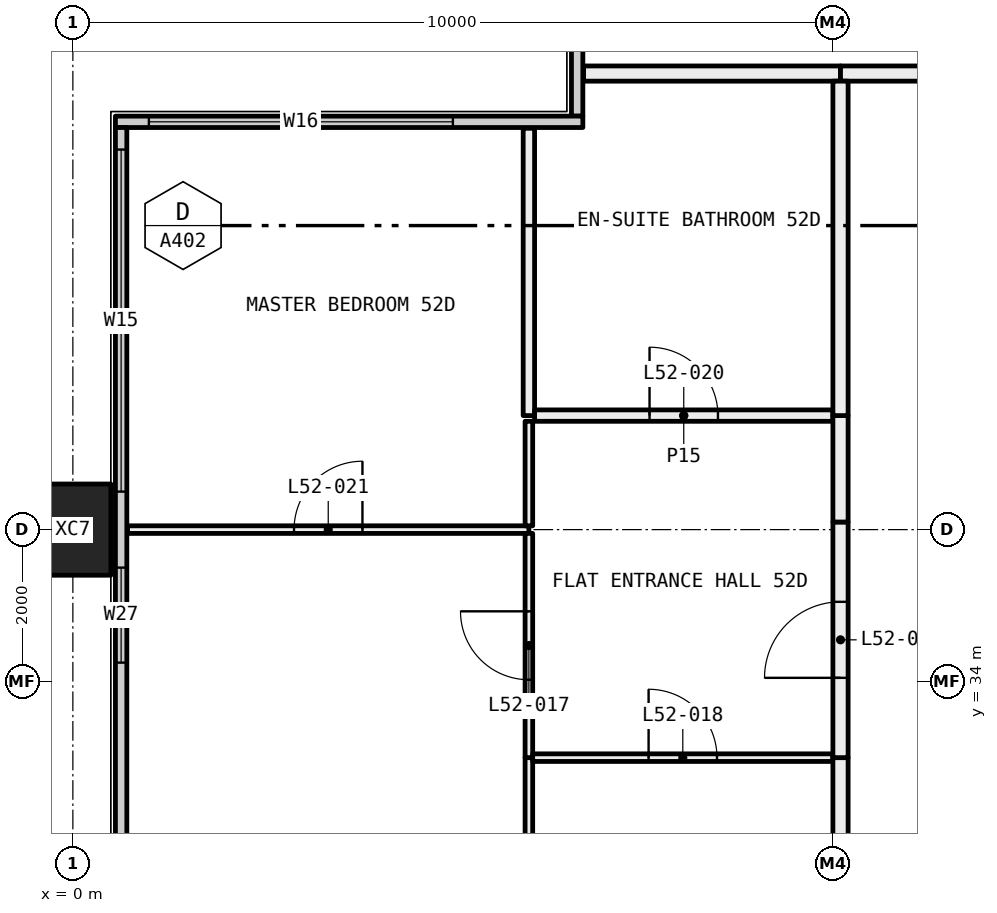
"""IFC4 building model, lengths in metres.
Left out: names, types, materials, properties, quantities, classifications, styles, units other than length and angle.
Written with IfcOpenShell. Run it as: python <this file> out.ifc"""

import sys

from ifc_helpers import new_model, si_unit, direction, frame, frame_2d, origin, origin_2d, place, context, subcontext, project, spatial, rectangle, hollow_rectangle, extrude, element, fill, save


model = new_model("IFC4")
c1 = context("Model", 3, precision=1e-05, world=origin(), true_north=direction((0.0, 1.0)))
c2 = subcontext(c1, "Body", "Model", "MODEL_VIEW")
j1 = project(units=[si_unit("LENGTHUNIT", "METRE"), si_unit("PLANEANGLEUNIT", "RADIAN")], contexts=[c1])
p1 = place(None, origin())
s1 = spatial("IfcSite", under=j1, at=p1, CompositionType="ELEMENT")
p2 = place(p1, origin())
s2 = spatial("IfcBuilding", under=s1, at=p2, CompositionType="ELEMENT")
p3 = place(p2, frame((0.0, 0.0, 196.2)))
s3 = spatial("IfcBuildingStorey", under=s2, at=p3, CompositionType="ELEMENT", Elevation=196.2)
p4 = place(p3, frame((0.0, 36.0, -0.4), z_axis=(0.0, 0.0, 1.0), x_axis=(0.0, 1.0, 0.0)))
e1 = element("IfcColumn", 1, at=p4, inside=s3, PredefinedType="COLUMN", context=c2, shape_type="SweptSolid", body=[
    extrude(hollow_rectangle(XDim=1.2, YDim=1.0, WallThickness=0.045, at=origin_2d()), origin(), (0.0, 0.0, 1.0), 3.45),
])
p5 = place(p3, frame((6.635, 41.44, 0.0), z_axis=(0.0, 0.0, 1.0), x_axis=(0.0, 1.0, 0.0)))
e2 = element("IfcWall", 2, at=p5, inside=s3, PredefinedType="ELEMENTEDWALL", context=c2, shape_type="SweptSolid", body=[
    extrude(rectangle(XDim=5.85, YDim=0.15, at=frame_2d((2.925, 0.0))), origin(), (0.0, 0.0, 1.0), 3.05),
])
p6 = place(p5, frame((1.56, 0.0, 0.45)))
e3 = element("IfcOpeningElement", 3, at=p6, cuts=e2, PredefinedType="OPENING", context=c2, shape_type="SweptSolid", body=[
    extrude(rectangle(XDim=4.0, YDim=2.55, at=frame_2d((2.0, 1.275))), frame((0.0, 0.085, 0.0), z_axis=(0.0, -1.0, 0.0), x_axis=(1.0, 0.0, 0.0)), (0.0, 0.0, 1.0), 0.17),
])
p7 = place(p3, frame((0.56, 41.365, 0.0), z_axis=(0.0, 0.0, 1.0), x_axis=(1.0, 0.0, 0.0)))
e4 = element("IfcWall", 4, at=p7, inside=s3, PredefinedType="ELEMENTEDWALL", context=c2, shape_type="SweptSolid", body=[
    extrude(rectangle(XDim=6.15, YDim=0.15, at=frame_2d((3.075, 0.0))), origin(), (0.0, 0.0, 1.0), 3.05),
])
p8 = place(p7, frame((0.44, 0.0, 0.45)))
e5 = element("IfcOpeningElement", 5, at=p8, cuts=e4, PredefinedType="OPENING", context=c2, shape_type="SweptSolid", body=[
    extrude(rectangle(XDim=4.0, YDim=2.55, at=frame_2d((2.0, 1.275))), frame((0.0, 0.085, 0.0), z_axis=(0.0, -1.0, 0.0), x_axis=(1.0, 0.0, 0.0)), (0.0, 0.0, 1.0), 0.17),
])
p9 = place(p3, frame((0.635, 18.71, 0.0), z_axis=(0.0, 0.0, 1.0), x_axis=(0.0, 1.0, 0.0)))
e6 = element("IfcWall", 6, at=p9, inside=s3, PredefinedType="ELEMENTEDWALL", context=c2, shape_type="SweptSolid", body=[
    extrude(rectangle(XDim=22.58, YDim=0.15, at=frame_2d((11.29, 0.0))), origin(), (0.0, 0.0, 1.0), 3.05),
])
p10 = place(p9, frame((0.29, 0.0, 0.45)))
e7 = element("IfcOpeningElement", 7, at=p10, cuts=e6, PredefinedType="OPENING", context=c2, shape_type="SweptSolid", body=[
    extrude(rectangle(XDim=4.5, YDim=2.55, at=frame_2d((2.25, 1.275))), frame((0.0, 0.085, 0.0), z_axis=(0.0, -1.0, 0.0), x_axis=(1.0, 0.0, 0.0)), (0.0, 0.0, 1.0), 0.17),
])
p11 = place(p9, frame((5.79, 0.0, 0.45)))
e8 = element("IfcOpeningElement", 8, at=p11, cuts=e6, PredefinedType="OPENING", context=c2, shape_type="SweptSolid", body=[
    extrude(rectangle(XDim=1.25, YDim=2.55, at=frame_2d((0.625, 1.275))), frame((0.0, 0.085, 0.0), z_axis=(0.0, -1.0, 0.0), x_axis=(1.0, 0.0, 0.0)), (0.0, 0.0, 1.0), 0.17),
])
p12 = place(p9, frame((9.54, 0.0, 0.45)))
e9 = element("IfcOpeningElement", 9, at=p12, cuts=e6, PredefinedType="OPENING", context=c2, shape_type="SweptSolid", body=[
    extrude(rectangle(XDim=1.25, YDim=2.55, at=frame_2d((0.625, 1.275))), frame((0.0, 0.085, 0.0), z_axis=(0.0, -1.0, 0.0), x_axis=(1.0, 0.0, 0.0)), (0.0, 0.0, 1.0), 0.17),
])
p13 = place(p9, frame((11.79, 0.0, 0.45)))
e10 = element("IfcOpeningElement", 10, at=p13, cuts=e6, PredefinedType="OPENING", context=c2, shape_type="SweptSolid", body=[
    extrude(rectangle(XDim=1.25, YDim=2.55, at=frame_2d((0.625, 1.275))), frame((0.0, 0.085, 0.0), z_axis=(0.0, -1.0, 0.0), x_axis=(1.0, 0.0, 0.0)), (0.0, 0.0, 1.0), 0.17),
])
p14 = place(p9, frame((15.54, 0.0, 0.45)))
e11 = element("IfcOpeningElement", 11, at=p14, cuts=e6, PredefinedType="OPENING", context=c2, shape_type="SweptSolid", body=[
    extrude(rectangle(XDim=1.25, YDim=2.55, at=frame_2d((0.625, 1.275))), frame((0.0, 0.085, 0.0), z_axis=(0.0, -1.0, 0.0), x_axis=(1.0, 0.0, 0.0)), (0.0, 0.0, 1.0), 0.17),
])
p15 = place(p9, frame((17.79, 0.0, 0.45)))
e12 = element("IfcOpeningElement", 12, at=p15, cuts=e6, PredefinedType="OPENING", context=c2, shape_type="SweptSolid", body=[
    extrude(rectangle(XDim=4.5, YDim=2.55, at=frame_2d((2.25, 1.275))), frame((0.0, 0.085, 0.0), z_axis=(0.0, -1.0, 0.0), x_axis=(1.0, 0.0, 0.0)), (0.0, 0.0, 1.0), 0.17),
])
p16 = place(p3, frame((6.72, 42.0, 0.0), z_axis=(0.0, 0.0, 1.0), x_axis=(1.0, 0.0, 0.0)))
e13 = element("IfcWall", 13, at=p16, inside=s3, PredefinedType="PARTITIONING", context=c2, shape_type="SweptSolid", body=[
    extrude(rectangle(XDim=3.38, YDim=0.2, at=frame_2d((1.69, 0.0))), origin(), (0.0, 0.0, 1.0), 3.05),
])
p17 = place(p3, frame((10.1, 42.0, 0.0), z_axis=(0.0, 0.0, 1.0), x_axis=(1.0, 0.0, 0.0)))
e14 = element("IfcWall", 14, at=p17, inside=s3, PredefinedType="PARTITIONING", context=c2, shape_type="SweptSolid", body=[
    extrude(rectangle(XDim=1.9, YDim=0.2, at=frame_2d((0.95, 0.0))), origin(), (0.0, 0.0, 1.0), 3.05),
])
p18 = place(p3, frame((6.0, 36.0, 0.0), z_axis=(0.0, 0.0, 1.0), x_axis=(-1.0, 0.0, 0.0)))
e15 = element("IfcWall", 15, at=p18, inside=s3, PredefinedType="PARTITIONING", context=c2, shape_type="SweptSolid", body=[
    extrude(rectangle(XDim=5.28, YDim=0.1, at=frame_2d((2.64, 0.0))), origin(), (0.0, 0.0, 1.0), 2.45),
])
p19 = place(p18, frame((2.19, 0.0, 0.0)))
e16 = element("IfcOpeningElement", 16, at=p19, cuts=e15, PredefinedType="OPENING", context=c2, shape_type="SweptSolid", body=[
    extrude(rectangle(XDim=0.9, YDim=2.1, at=frame_2d((0.45, 1.05))), frame((0.0, 0.06, 0.0), z_axis=(0.0, -1.0, 0.0), x_axis=(1.0, 0.0, 0.0)), (0.0, 0.0, 1.0), 0.12),
])
p20 = place(p3, frame((6.0, 24.05, 0.0), z_axis=(0.0, 0.0, 1.0), x_axis=(0.0, 1.0, 0.0)))
e17 = element("IfcWall", 17, at=p20, inside=s3, PredefinedType="PARTITIONING", context=c2, shape_type="SweptSolid", body=[
    extrude(rectangle(XDim=8.95, YDim=0.1, at=frame_2d((4.475, 0.0))), origin(), (0.0, 0.0, 1.0), 2.45),
])
p21 = place(p3, frame((6.0, 33.0, 0.0), z_axis=(0.0, 0.0, 1.0), x_axis=(0.0, 1.0, 0.0)))
e18 = element("IfcWall", 18, at=p21, inside=s3, PredefinedType="PARTITIONING", context=c2, shape_type="SweptSolid", body=[
    extrude(rectangle(XDim=2.95, YDim=0.1, at=frame_2d((1.475, 0.0))), origin(), (0.0, 0.0, 1.0), 2.45),
])
p22 = place(p21, frame((1.025, 0.0, 0.0)))
e19 = element("IfcOpeningElement", 19, at=p22, cuts=e18, PredefinedType="OPENING", context=c2, shape_type="SweptSolid", body=[
    extrude(rectangle(XDim=0.9, YDim=2.1, at=frame_2d((0.45, 1.05))), frame((0.0, 0.06, 0.0), z_axis=(0.0, -1.0, 0.0), x_axis=(1.0, 0.0, 0.0)), (0.0, 0.0, 1.0), 0.12),
])
p23 = place(p3, frame((6.0, 36.05, 0.0), z_axis=(0.0, 0.0, 1.0), x_axis=(0.0, 1.0, 0.0)))
e20 = element("IfcWall", 20, at=p23, inside=s3, PredefinedType="PARTITIONING", context=c2, shape_type="SweptSolid", body=[
    extrude(rectangle(XDim=1.375, YDim=0.1, at=frame_2d((0.688, 0.0))), origin(), (0.0, 0.0, 1.0), 2.45),
])
p24 = place(p3, frame((6.0, 37.5, 0.0), z_axis=(0.0, 0.0, 1.0), x_axis=(0.0, 1.0, 0.0)))
e21 = element("IfcWall", 21, at=p24, inside=s3, PredefinedType="PARTITIONING", context=c2, shape_type="SweptSolid", body=[
    extrude(rectangle(XDim=3.78, YDim=0.15, at=frame_2d((1.89, 0.0))), origin(), (0.0, 0.0, 1.0), 3.05),
])
p25 = place(p3, frame((10.0, 33.0, 0.0), z_axis=(0.0, 0.0, 1.0), x_axis=(-1.0, 0.0, 0.0)))
e22 = element("IfcWall", 22, at=p25, inside=s3, PredefinedType="PARTITIONING", context=c2, shape_type="SweptSolid", body=[
    extrude(rectangle(XDim=3.95, YDim=0.1, at=frame_2d((1.975, 0.0))), origin(), (0.0, 0.0, 1.0), 3.05),
])
p26 = place(p25, frame((1.525, 0.0, 0.0)))
e23 = element("IfcOpeningElement", 23, at=p26, cuts=e22, PredefinedType="OPENING", context=c2, shape_type="SweptSolid", body=[
    extrude(rectangle(XDim=0.9, YDim=2.1, at=frame_2d((0.45, 1.05))), frame((0.0, 0.06, 0.0), z_axis=(0.0, -1.0, 0.0), x_axis=(1.0, 0.0, 0.0)), (0.0, 0.0, 1.0), 0.12),
])
p27 = place(p3, frame((10.1, 24.1, 0.0), z_axis=(0.0, 0.0, 1.0), x_axis=(0.0, 1.0, 0.0)))
e24 = element("IfcWall", 24, at=p27, inside=s3, PredefinedType="PARTITIONING", context=c2, shape_type="SweptSolid", body=[
    extrude(rectangle(XDim=8.9, YDim=0.2, at=frame_2d((4.45, 0.0))), origin(), (0.0, 0.0, 1.0), 3.05),
])
p28 = place(p3, frame((10.0, 37.5, 0.0), z_axis=(0.0, 0.0, 1.0), x_axis=(-1.0, 0.0, 0.0)))
e25 = element("IfcWall", 25, at=p28, inside=s3, PredefinedType="PARTITIONING", context=c2, shape_type="SweptSolid", body=[
    extrude(rectangle(XDim=3.925, YDim=0.15, at=frame_2d((1.962, 0.0))), origin(), (0.0, 0.0, 1.0), 3.05),
])
p29 = place(p28, frame((1.512, 0.0, 0.0)))
e26 = element("IfcOpeningElement", 26, at=p29, cuts=e25, PredefinedType="OPENING", context=c2, shape_type="SweptSolid", body=[
    extrude(rectangle(XDim=0.9, YDim=2.1, at=frame_2d((0.45, 1.05))), frame((0.0, 0.085, 0.0), z_axis=(0.0, -1.0, 0.0), x_axis=(1.0, 0.0, 0.0)), (0.0, 0.0, 1.0), 0.17),
])
p30 = place(p3, frame((10.1, 33.0, 0.0), z_axis=(0.0, 0.0, 1.0), x_axis=(0.0, 1.0, 0.0)))
e27 = element("IfcWall", 27, at=p30, inside=s3, PredefinedType="PARTITIONING", context=c2, shape_type="SweptSolid", body=[
    extrude(rectangle(XDim=3.1, YDim=0.2, at=frame_2d((1.55, 0.0))), origin(), (0.0, 0.0, 1.0), 2.45),
])
p31 = place(p30, frame((1.05, 0.0, 0.0)))
e28 = element("IfcOpeningElement", 28, at=p31, cuts=e27, PredefinedType="OPENING", context=c2, shape_type="SweptSolid", body=[
    extrude(rectangle(XDim=1.0, YDim=2.1, at=frame_2d((0.5, 1.05))), frame((0.0, 0.11, 0.0), z_axis=(0.0, -1.0, 0.0), x_axis=(1.0, 0.0, 0.0)), (0.0, 0.0, 1.0), 0.22),
])
p32 = place(p3, frame((10.1, 36.1, 0.0), z_axis=(0.0, 0.0, 1.0), x_axis=(0.0, 1.0, 0.0)))
e29 = element("IfcWall", 29, at=p32, inside=s3, PredefinedType="PARTITIONING", context=c2, shape_type="SweptSolid", body=[
    extrude(rectangle(XDim=1.4, YDim=0.2, at=frame_2d((0.7, 0.0))), origin(), (0.0, 0.0, 1.0), 3.05),
])
p33 = place(p3, frame((10.1, 37.5, 0.0), z_axis=(0.0, 0.0, 1.0), x_axis=(0.0, 1.0, 0.0)))
e30 = element("IfcWall", 30, at=p33, inside=s3, PredefinedType="PARTITIONING", context=c2, shape_type="SweptSolid", body=[
    extrude(rectangle(XDim=4.4, YDim=0.2, at=frame_2d((2.2, 0.0))), origin(), (0.0, 0.0, 1.0), 3.05),
])
p34 = place(p8, origin())
e31 = element("IfcWindow", 31, at=p34, inside=s3, PartitioningType="SINGLE_PANEL", PredefinedType="WINDOW", context=c2, shape_type="SweptSolid", body=[
    extrude(rectangle(XDim=4.0, YDim=2.55, at=frame_2d((2.0, 1.275))), frame((0.0, 0.03, 0.0), z_axis=(0.0, -1.0, 0.0), x_axis=(1.0, 0.0, 0.0)), (0.0, 0.0, 1.0), 0.06),
])
fill(e5, e31)
p35 = place(p14, origin())
e32 = element("IfcWindow", 32, at=p35, inside=s3, PartitioningType="SINGLE_PANEL", PredefinedType="WINDOW", context=c2, shape_type="SweptSolid", body=[
    extrude(rectangle(XDim=1.25, YDim=2.55, at=frame_2d((0.625, 1.275))), frame((0.0, 0.03, 0.0), z_axis=(0.0, -1.0, 0.0), x_axis=(1.0, 0.0, 0.0)), (0.0, 0.0, 1.0), 0.06),
])
fill(e11, e32)
p36 = place(p15, origin())
e33 = element("IfcWindow", 33, at=p36, inside=s3, PartitioningType="SINGLE_PANEL", PredefinedType="WINDOW", context=c2, shape_type="SweptSolid", body=[
    extrude(rectangle(XDim=4.5, YDim=2.55, at=frame_2d((2.25, 1.275))), frame((0.0, 0.03, 0.0), z_axis=(0.0, -1.0, 0.0), x_axis=(1.0, 0.0, 0.0)), (0.0, 0.0, 1.0), 0.06),
])
fill(e12, e33)
p37 = place(p31, origin())
e34 = element("IfcDoor", 34, at=p37, inside=s3, OperationType="SINGLE_SWING_RIGHT", PredefinedType="DOOR", context=c2, shape_type="SweptSolid", body=[
    extrude(rectangle(XDim=1.0, YDim=2.1, at=frame_2d((0.5, 1.05))), frame((0.0, 0.025, 0.0), z_axis=(0.0, -1.0, 0.0), x_axis=(1.0, 0.0, 0.0)), (0.0, 0.0, 1.0), 0.05),
])
fill(e28, e34)
p38 = place(p22, origin())
e35 = element("IfcDoor", 35, at=p38, inside=s3, OperationType="SINGLE_SWING_LEFT", PredefinedType="DOOR", context=c2, shape_type="SweptSolid", body=[
    extrude(rectangle(XDim=0.9, YDim=2.1, at=frame_2d((0.45, 1.05))), frame((0.0, 0.025, 0.0), z_axis=(0.0, -1.0, 0.0), x_axis=(1.0, 0.0, 0.0)), (0.0, 0.0, 1.0), 0.05),
])
fill(e19, e35)
p39 = place(p26, frame((0.9, 0.0, 0.0), x_axis=(-1.0, 0.0, 0.0)))
e36 = element("IfcDoor", 36, at=p39, inside=s3, OperationType="SINGLE_SWING_RIGHT", PredefinedType="DOOR", context=c2, shape_type="SweptSolid", body=[
    extrude(rectangle(XDim=0.9, YDim=2.1, at=frame_2d((0.45, 1.05))), frame((0.0, 0.025, 0.0), z_axis=(0.0, -1.0, 0.0), x_axis=(1.0, 0.0, 0.0)), (0.0, 0.0, 1.0), 0.05),
])
fill(e23, e36)
p40 = place(p29, frame((0.9, 0.0, 0.0), x_axis=(-1.0, 0.0, 0.0)))
e37 = element("IfcDoor", 37, at=p40, inside=s3, OperationType="SINGLE_SWING_RIGHT", PredefinedType="DOOR", context=c2, shape_type="SweptSolid", body=[
    extrude(rectangle(XDim=0.9, YDim=2.1, at=frame_2d((0.45, 1.05))), frame((0.0, 0.025, 0.0), z_axis=(0.0, -1.0, 0.0), x_axis=(1.0, 0.0, 0.0)), (0.0, 0.0, 1.0), 0.05),
])
fill(e26, e37)
p41 = place(p19, frame((0.9, 0.0, 0.0), x_axis=(-1.0, 0.0, 0.0)))
e38 = element("IfcDoor", 38, at=p41, inside=s3, OperationType="SINGLE_SWING_LEFT", PredefinedType="DOOR", context=c2, shape_type="SweptSolid", body=[
    extrude(rectangle(XDim=0.9, YDim=2.1, at=frame_2d((0.45, 1.05))), frame((0.0, 0.025, 0.0), z_axis=(0.0, -1.0, 0.0), x_axis=(1.0, 0.0, 0.0)), (0.0, 0.0, 1.0), 0.05),
])
fill(e16, e38)
save(model, sys.argv[1])
